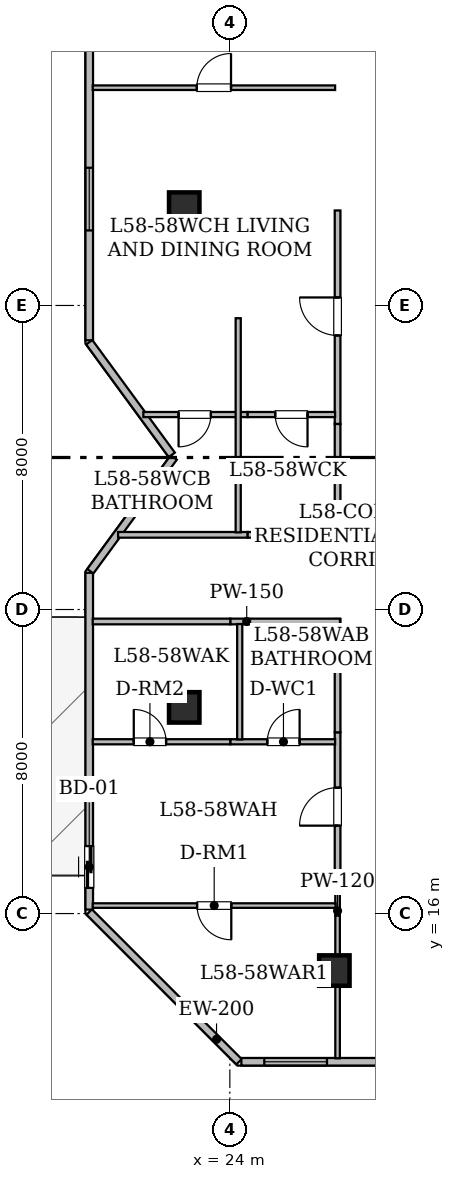
"""IFC4 building model, lengths in metres.
Left out: names, types, materials, properties, quantities, classifications, styles, units other than length and angle.
Written with IfcOpenShell. Run it as: python <this file> out.ifc"""

import sys

from ifc_helpers import new_model, si_unit, direction, frame, frame_2d, origin, origin_2d, place, context, subcontext, project, spatial, rectangle, hollow_rectangle, extrude, element, fill, save


model = new_model("IFC4")
c1 = context("Model", 3, precision=1e-05, world=origin(), true_north=direction((0.0, 1.0)))
c2 = subcontext(c1, "Body", "Model", "MODEL_VIEW")
j1 = project(units=[si_unit("LENGTHUNIT", "METRE"), si_unit("PLANEANGLEUNIT", "RADIAN")], contexts=[c1])
p1 = place(None, origin())
s1 = spatial("IfcSite", under=j1, at=p1, CompositionType="ELEMENT")
p2 = place(p1, origin())
s2 = spatial("IfcBuilding", under=s1, at=p2, CompositionType="ELEMENT")
p3 = place(p2, frame((0.0, 0.0, 228.15)))
s3 = spatial("IfcBuildingStorey", under=s2, at=p3, CompositionType="ELEMENT", Elevation=228.15)
for number, where, z_axis, x_axis in (
    (1, (26.75, 14.5, 0.0), (0.0, 0.0, 1.0), (1.0, 0.0, 0.0)),
    (2, (22.8, 21.425, 0.0), (0.0, 0.0, 1.0), (1.0, 0.0, 0.0)),
    (3, (22.8, 34.575, 0.0), (0.0, 0.0, 1.0), (1.0, 0.0, 0.0)),
):
    element("IfcColumn", number, at=place(p3, frame(where, z_axis=z_axis, x_axis=x_axis)), inside=s3, PredefinedType="COLUMN", context=c2, shape_type="SweptSolid", body=[
        extrude(hollow_rectangle(XDim=0.8, YDim=0.8, WallThickness=0.04, at=origin_2d()), origin(), (0.0, 0.0, 1.0), 3.65),
    ])
p4 = place(p3, frame((24.241, 12.1, 0.0), z_axis=(0.0, 0.0, 1.0), x_axis=(-0.707106781187, 0.707106781187, 0.0)))
e4 = element("IfcWall", 4, at=p4, inside=s3, PredefinedType="STANDARD", context=c2, shape_type="SweptSolid", body=[
    extrude(rectangle(XDim=5.573, YDim=0.2, at=frame_2d((2.787, 0.0))), origin(), (0.0, 0.0, 1.0), 3.43),
])
p5 = place(p3, frame((20.3, 16.104, 0.0), z_axis=(0.0, 0.0, 1.0), x_axis=(0.0, 1.0, 0.0)))
e5 = element("IfcWall", 5, at=p5, inside=s3, PredefinedType="STANDARD", context=c2, shape_type="SweptSolid", body=[
    extrude(rectangle(XDim=8.863, YDim=0.2, at=frame_2d((4.432, 0.0))), origin(), (0.0, 0.0, 1.0), 3.43),
])
p6 = place(p5, frame((0.571, 0.0, 0.0)))
e6 = element("IfcOpeningElement", 6, at=p6, cuts=e5, PredefinedType="OPENING", context=c2, shape_type="SweptSolid", body=[
    extrude(rectangle(XDim=1.1, YDim=2.2, at=frame_2d((0.55, 1.1))), frame((0.0, 0.11, 0.0), z_axis=(0.0, -1.0, 0.0), x_axis=(1.0, 0.0, 0.0)), (0.0, 0.0, 1.0), 0.22),
])
p7 = place(p3, frame((20.329, 25.007, 0.0), z_axis=(0.0, 0.0, 1.0), x_axis=(0.591366515379, 0.806402904564, 0.0)))
e7 = element("IfcWall", 7, at=p7, inside=s3, PredefinedType="STANDARD", context=c2, shape_type="SweptSolid", body=[
    extrude(rectangle(XDim=3.711, YDim=0.2, at=frame_2d((1.856, 0.0))), origin(), (0.0, 0.0, 1.0), 3.43),
])
p8 = place(p3, frame((22.473, 28.069, 0.0), z_axis=(0.0, 0.0, 1.0), x_axis=(-0.591248456881, 0.80648946815, 0.0)))
e8 = element("IfcWall", 8, at=p8, inside=s3, PredefinedType="STANDARD", context=c2, shape_type="SweptSolid", body=[
    extrude(rectangle(XDim=3.675, YDim=0.2, at=frame_2d((1.837, 0.0))), origin(), (0.0, 0.0, 1.0), 3.43),
])
p9 = place(p3, frame((20.3, 31.084, 0.0), z_axis=(0.0, 0.0, 1.0), x_axis=(0.0, 1.0, 0.0)))
e9 = element("IfcWall", 9, at=p9, inside=s3, PredefinedType="STANDARD", context=c2, shape_type="SweptSolid", body=[
    extrude(rectangle(XDim=8.875, YDim=0.2, at=frame_2d((4.438, 0.0))), origin(), (0.0, 0.0, 1.0), 3.43),
])
p10 = place(p9, frame((2.89, 0.0, 0.85)))
e10 = element("IfcOpeningElement", 10, at=p10, cuts=e9, PredefinedType="OPENING", context=c2, shape_type="SweptSolid", body=[
    extrude(rectangle(XDim=1.65, YDim=1.55, at=frame_2d((0.825, 0.775))), frame((0.0, 0.11, 0.0), z_axis=(0.0, -1.0, 0.0), x_axis=(1.0, 0.0, 0.0)), (0.0, 0.0, 1.0), 0.22),
])
p11 = place(p3, frame((65.696, 12.1, 0.0), z_axis=(0.0, 0.0, 1.0), x_axis=(-1.0, 0.0, 0.0)))
e11 = element("IfcWall", 11, at=p11, inside=s3, PredefinedType="STANDARD", context=c2, shape_type="SweptSolid", body=[
    extrude(rectangle(XDim=41.393, YDim=0.2, at=frame_2d((20.697, 0.0))), origin(), (0.0, 0.0, 1.0), 3.43),
])
p12 = place(p11, frame((34.521, 0.0, 0.85)))
e12 = element("IfcOpeningElement", 12, at=p12, cuts=e11, PredefinedType="OPENING", context=c2, shape_type="SweptSolid", body=[
    extrude(rectangle(XDim=1.65, YDim=1.55, at=frame_2d((0.825, 0.775))), frame((0.0, 0.11, 0.0), z_axis=(0.0, -1.0, 0.0), x_axis=(1.0, 0.0, 0.0)), (0.0, 0.0, 1.0), 0.22),
])
p13 = place(p11, frame((39.14, 0.0, 0.85)))
e13 = element("IfcOpeningElement", 13, at=p13, cuts=e11, PredefinedType="OPENING", context=c2, shape_type="SweptSolid", body=[
    extrude(rectangle(XDim=1.65, YDim=1.55, at=frame_2d((0.825, 0.775))), frame((0.0, 0.11, 0.0), z_axis=(0.0, -1.0, 0.0), x_axis=(1.0, 0.0, 0.0)), (0.0, 0.0, 1.0), 0.22),
])
p14 = place(p11, frame((15.596, 0.0, 0.8)))
e14 = element("IfcOpeningElement", 14, at=p14, cuts=e11, PredefinedType="OPENING", context=c2, shape_type="SweptSolid", body=[
    extrude(rectangle(XDim=1.2, YDim=1.5, at=frame_2d((0.6, 0.75))), frame((0.0, 0.11, 0.0), z_axis=(0.0, -1.0, 0.0), x_axis=(1.0, 0.0, 0.0)), (0.0, 0.0, 1.0), 0.22),
])
p15 = place(p11, frame((19.706, 0.0, 0.85)))
e15 = element("IfcOpeningElement", 15, at=p15, cuts=e11, PredefinedType="OPENING", context=c2, shape_type="SweptSolid", body=[
    extrude(rectangle(XDim=1.65, YDim=1.55, at=frame_2d((0.825, 0.775))), frame((0.0, 0.11, 0.0), z_axis=(0.0, -1.0, 0.0), x_axis=(1.0, 0.0, 0.0)), (0.0, 0.0, 1.0), 0.22),
])
p16 = place(p11, frame((11.036, 0.0, 0.85)))
e16 = element("IfcOpeningElement", 16, at=p16, cuts=e11, PredefinedType="OPENING", context=c2, shape_type="SweptSolid", body=[
    extrude(rectangle(XDim=1.65, YDim=1.55, at=frame_2d((0.825, 0.775))), frame((0.0, 0.11, 0.0), z_axis=(0.0, -1.0, 0.0), x_axis=(1.0, 0.0, 0.0)), (0.0, 0.0, 1.0), 0.22),
])
p17 = place(p11, frame((4.786, 0.0, 0.85)))
e17 = element("IfcOpeningElement", 17, at=p17, cuts=e11, PredefinedType="OPENING", context=c2, shape_type="SweptSolid", body=[
    extrude(rectangle(XDim=1.65, YDim=1.55, at=frame_2d((0.825, 0.775))), frame((0.0, 0.11, 0.0), z_axis=(0.0, -1.0, 0.0), x_axis=(1.0, 0.0, 0.0)), (0.0, 0.0, 1.0), 0.22),
])
p18 = place(p3, frame((34.114, 16.835, 0.0), z_axis=(0.0, 0.0, 1.0), x_axis=(-1.0, 0.0, 0.0)))
e18 = element("IfcWall", 18, at=p18, inside=s3, PredefinedType="STANDARD", context=c2, shape_type="SweptSolid", body=[
    extrude(rectangle(XDim=7.214, YDim=0.15, at=frame_2d((3.607, 0.0))), origin(), (0.0, 0.0, 1.0), 2.725),
])
p19 = place(p18, frame((3.053, 0.0, 0.0)))
e19 = element("IfcOpeningElement", 19, at=p19, cuts=e18, PredefinedType="OPENING", context=c2, shape_type="SweptSolid", body=[
    extrude(rectangle(XDim=1.15, YDim=2.2, at=frame_2d((0.575, 1.1))), frame((0.0, 0.085, 0.0), z_axis=(0.0, -1.0, 0.0), x_axis=(1.0, 0.0, 0.0)), (0.0, 0.0, 1.0), 0.17),
])
p20 = place(p3, frame((26.835, 16.9, 0.0), z_axis=(0.0, 0.0, 1.0), x_axis=(0.0, 1.0, 0.0)))
e20 = element("IfcWall", 20, at=p20, inside=s3, PredefinedType="STANDARD", context=c2, shape_type="SweptSolid", body=[
    extrude(rectangle(XDim=3.869, YDim=0.15, at=frame_2d((1.935, 0.0))), origin(), (0.0, 0.0, 1.0), 2.725),
])
p21 = place(p20, frame((1.413, 0.0, 0.0)))
e21 = element("IfcOpeningElement", 21, at=p21, cuts=e20, PredefinedType="OPENING", context=c2, shape_type="SweptSolid", body=[
    extrude(rectangle(XDim=1.0, YDim=2.15, at=frame_2d((0.5, 1.075))), frame((0.0, 0.085, 0.0), z_axis=(0.0, -1.0, 0.0), x_axis=(1.0, 0.0, 0.0)), (0.0, 0.0, 1.0), 0.17),
])
p22 = place(p3, frame((26.835, 20.769, 0.0), z_axis=(0.0, 0.0, 1.0), x_axis=(0.0, 1.0, 0.0)))
e22 = element("IfcWall", 22, at=p22, inside=s3, PredefinedType="STANDARD", context=c2, shape_type="SweptSolid", body=[
    extrude(rectangle(XDim=2.981, YDim=0.15, at=frame_2d((1.49, 0.0))), origin(), (0.0, 0.0, 1.0), 3.43),
])
p23 = place(p3, frame((26.898, 23.685, 0.0), z_axis=(0.0, 0.0, 1.0), x_axis=(-1.0, 0.0, 0.0)))
e23 = element("IfcWall", 23, at=p23, inside=s3, PredefinedType="STANDARD", context=c2, shape_type="SweptSolid", body=[
    extrude(rectangle(XDim=2.887, YDim=0.15, at=frame_2d((1.443, 0.0))), origin(), (0.0, 0.0, 1.0), 3.43),
])
p24 = place(p3, frame((24.011, 23.685, 0.0), z_axis=(0.0, 0.0, 1.0), x_axis=(-1.0, 0.0, 0.0)))
e24 = element("IfcWall", 24, at=p24, inside=s3, PredefinedType="STANDARD", context=c2, shape_type="SweptSolid", body=[
    extrude(rectangle(XDim=3.619, YDim=0.15, at=frame_2d((1.81, 0.0))), origin(), (0.0, 0.0, 1.0), 2.887),
])
p25 = place(p3, frame((26.835, 28.881, 0.0), z_axis=(0.0, 0.0, 1.0), x_axis=(0.0, 1.0, 0.0)))
e25 = element("IfcWall", 25, at=p25, inside=s3, PredefinedType="STANDARD", context=c2, shape_type="SweptSolid", body=[
    extrude(rectangle(XDim=5.619, YDim=0.15, at=frame_2d((2.81, 0.0))), origin(), (0.0, 0.0, 1.0), 3.065),
])
p26 = place(p25, frame((2.33, 0.0, 0.0)))
e26 = element("IfcOpeningElement", 26, at=p26, cuts=e25, PredefinedType="OPENING", context=c2, shape_type="SweptSolid", body=[
    extrude(rectangle(XDim=1.0, YDim=2.15, at=frame_2d((0.5, 1.075))), frame((0.0, 0.085, 0.0), z_axis=(0.0, -1.0, 0.0), x_axis=(1.0, 0.0, 0.0)), (0.0, 0.0, 1.0), 0.17),
])
p27 = place(p3, frame((21.059, 25.965, 0.0), z_axis=(0.0, 0.0, 1.0), x_axis=(1.0, 0.0, 0.0)))
e27 = element("IfcWall", 27, at=p27, inside=s3, PredefinedType="STANDARD", context=c2, shape_type="SweptSolid", body=[
    extrude(rectangle(XDim=3.41, YDim=0.15, at=frame_2d((1.705, 0.0))), origin(), (0.0, 0.0, 1.0), 2.887),
])
p28 = place(p3, frame((24.469, 25.965, 0.0), z_axis=(0.0, 0.0, 1.0), x_axis=(1.0, 0.0, 0.0)))
e28 = element("IfcWall", 28, at=p28, inside=s3, PredefinedType="STANDARD", context=c2, shape_type="SweptSolid", body=[
    extrude(rectangle(XDim=2.431, YDim=0.15, at=frame_2d((1.215, 0.0))), origin(), (0.0, 0.0, 1.0), 3.43),
])
p29 = place(p3, frame((26.835, 25.9, 0.0), z_axis=(0.0, 0.0, 1.0), x_axis=(0.0, 1.0, 0.0)))
e29 = element("IfcWall", 29, at=p29, inside=s3, PredefinedType="STANDARD", context=c2, shape_type="SweptSolid", body=[
    extrude(rectangle(XDim=2.981, YDim=0.15, at=frame_2d((1.491, 0.0))), origin(), (0.0, 0.0, 1.0), 3.43),
])
p30 = place(p3, frame((26.835, 15.947, 0.0), z_axis=(0.0, 0.0, 1.0), x_axis=(0.0, 1.0, 0.0)))
e30 = element("IfcWall", 30, at=p30, inside=s3, PredefinedType="PARTITIONING", context=c2, shape_type="SweptSolid", body=[
    extrude(rectangle(XDim=0.823, YDim=0.12, at=frame_2d((0.412, 0.0))), origin(), (0.0, 0.0, 1.0), 3.43),
])
p31 = place(p3, frame((26.835, 12.192, 0.0), z_axis=(0.0, 0.0, 1.0), x_axis=(0.0, 1.0, 0.0)))
e31 = element("IfcWall", 31, at=p31, inside=s3, PredefinedType="PARTITIONING", context=c2, shape_type="SweptSolid", body=[
    extrude(rectangle(XDim=3.755, YDim=0.12, at=frame_2d((1.877, 0.0))), origin(), (0.0, 0.0, 1.0), 2.725),
])
p32 = place(p3, frame((24.011, 20.52, 0.0), z_axis=(0.0, 0.0, 1.0), x_axis=(1.0, 0.0, 0.0)))
e32 = element("IfcWall", 32, at=p32, inside=s3, PredefinedType="PARTITIONING", context=c2, shape_type="SweptSolid", body=[
    extrude(rectangle(XDim=2.759, YDim=0.135, at=frame_2d((1.379, 0.0))), origin(), (0.0, 0.0, 1.0), 2.725),
])
p33 = place(p32, frame((0.975, 0.0, 0.0)))
e33 = element("IfcOpeningElement", 33, at=p33, cuts=e32, PredefinedType="OPENING", context=c2, shape_type="SweptSolid", body=[
    extrude(rectangle(XDim=0.85, YDim=2.1, at=frame_2d((0.425, 1.05))), frame((0.0, 0.077, 0.0), z_axis=(0.0, -1.0, 0.0), x_axis=(1.0, 0.0, 0.0)), (0.0, 0.0, 1.0), 0.155),
])
p34 = place(p3, frame((20.392, 20.52, 0.0), z_axis=(0.0, 0.0, 1.0), x_axis=(1.0, 0.0, 0.0)))
e34 = element("IfcWall", 34, at=p34, inside=s3, PredefinedType="PARTITIONING", context=c2, shape_type="SweptSolid", body=[
    extrude(rectangle(XDim=3.619, YDim=0.135, at=frame_2d((1.81, 0.0))), origin(), (0.0, 0.0, 1.0), 2.887),
])
p35 = place(p34, frame((1.08, 0.0, 0.0)))
e35 = element("IfcOpeningElement", 35, at=p35, cuts=e34, PredefinedType="OPENING", context=c2, shape_type="SweptSolid", body=[
    extrude(rectangle(XDim=0.85, YDim=2.1, at=frame_2d((0.425, 1.05))), frame((0.0, 0.077, 0.0), z_axis=(0.0, -1.0, 0.0), x_axis=(1.0, 0.0, 0.0)), (0.0, 0.0, 1.0), 0.155),
])
p36 = place(p3, frame((26.783, 16.21, 0.0), z_axis=(0.0, 0.0, 1.0), x_axis=(-1.0, 0.0, 0.0)))
e36 = element("IfcWall", 36, at=p36, inside=s3, PredefinedType="PARTITIONING", context=c2, shape_type="SweptSolid", body=[
    extrude(rectangle(XDim=6.391, YDim=0.12, at=frame_2d((3.195, 0.0))), origin(), (0.0, 0.0, 1.0), 2.887),
])
p37 = place(p36, frame((2.745, 0.0, 0.0)))
e37 = element("IfcOpeningElement", 37, at=p37, cuts=e36, PredefinedType="OPENING", context=c2, shape_type="SweptSolid", body=[
    extrude(rectangle(XDim=0.9, YDim=2.1, at=frame_2d((0.45, 1.05))), frame((0.0, 0.07, 0.0), z_axis=(0.0, -1.0, 0.0), x_axis=(1.0, 0.0, 0.0)), (0.0, 0.0, 1.0), 0.14),
])
p38 = place(p3, frame((24.26, 20.581, 0.0), z_axis=(0.0, 0.0, 1.0), x_axis=(0.0, 1.0, 0.0)))
e38 = element("IfcWall", 38, at=p38, inside=s3, PredefinedType="PARTITIONING", context=c2, shape_type="SweptSolid", body=[
    extrude(rectangle(XDim=3.037, YDim=0.135, at=frame_2d((1.519, 0.0))), origin(), (0.0, 0.0, 1.0), 2.725),
])
p39 = place(p3, frame((24.469, 29.13, 0.0), z_axis=(0.0, 0.0, 1.0), x_axis=(-1.0, 0.0, 0.0)))
e39 = element("IfcWall", 39, at=p39, inside=s3, PredefinedType="PARTITIONING", context=c2, shape_type="SweptSolid", body=[
    extrude(rectangle(XDim=2.745, YDim=0.135, at=frame_2d((1.373, 0.0))), origin(), (0.0, 0.0, 1.0), 2.887),
])
p40 = place(p39, frame((0.968, 0.0, 0.0)))
e40 = element("IfcOpeningElement", 40, at=p40, cuts=e39, PredefinedType="OPENING", context=c2, shape_type="SweptSolid", body=[
    extrude(rectangle(XDim=0.85, YDim=2.1, at=frame_2d((0.425, 1.05))), frame((0.0, 0.077, 0.0), z_axis=(0.0, -1.0, 0.0), x_axis=(1.0, 0.0, 0.0)), (0.0, 0.0, 1.0), 0.155),
])
p41 = place(p3, frame((26.77, 29.13, 0.0), z_axis=(0.0, 0.0, 1.0), x_axis=(-1.0, 0.0, 0.0)))
e41 = element("IfcWall", 41, at=p41, inside=s3, PredefinedType="PARTITIONING", context=c2, shape_type="SweptSolid", body=[
    extrude(rectangle(XDim=2.301, YDim=0.135, at=frame_2d((1.15, 0.0))), origin(), (0.0, 0.0, 1.0), 3.43),
])
p42 = place(p41, frame((0.726, 0.0, 0.0)))
e42 = element("IfcOpeningElement", 42, at=p42, cuts=e41, PredefinedType="OPENING", context=c2, shape_type="SweptSolid", body=[
    extrude(rectangle(XDim=0.85, YDim=2.1, at=frame_2d((0.425, 1.05))), frame((0.0, 0.077, 0.0), z_axis=(0.0, -1.0, 0.0), x_axis=(1.0, 0.0, 0.0)), (0.0, 0.0, 1.0), 0.155),
])
p43 = place(p3, frame((20.392, 37.73, 0.0), z_axis=(0.0, 0.0, 1.0), x_axis=(1.0, 0.0, 0.0)))
e43 = element("IfcWall", 43, at=p43, inside=s3, PredefinedType="PARTITIONING", context=c2, shape_type="SweptSolid", body=[
    extrude(rectangle(XDim=6.378, YDim=0.12, at=frame_2d((3.189, 0.0))), origin(), (0.0, 0.0, 1.0), 2.887),
])
p44 = place(p43, frame((2.739, 0.0, 0.0)))
e44 = element("IfcOpeningElement", 44, at=p44, cuts=e43, PredefinedType="OPENING", context=c2, shape_type="SweptSolid", body=[
    extrude(rectangle(XDim=0.9, YDim=2.1, at=frame_2d((0.45, 1.05))), frame((0.0, 0.07, 0.0), z_axis=(0.0, -1.0, 0.0), x_axis=(1.0, 0.0, 0.0)), (0.0, 0.0, 1.0), 0.14),
])
p45 = place(p3, frame((24.22, 31.665, 0.0), z_axis=(0.0, 0.0, 1.0), x_axis=(0.0, -1.0, 0.0)))
e45 = element("IfcWall", 45, at=p45, inside=s3, PredefinedType="PARTITIONING", context=c2, shape_type="SweptSolid", body=[
    extrude(rectangle(XDim=5.635, YDim=0.135, at=frame_2d((2.817, 0.0))), origin(), (0.0, 0.0, 1.0), 3.43),
])
p46 = place(p6, origin())
e46 = element("IfcDoor", 46, at=p46, inside=s3, OperationType="SLIDING_TO_LEFT", PredefinedType="DOOR", context=c2, shape_type="SweptSolid", body=[
    extrude(rectangle(XDim=1.1, YDim=2.2, at=frame_2d((0.55, 1.1))), frame((0.0, 0.025, 0.0), z_axis=(0.0, -1.0, 0.0), x_axis=(1.0, 0.0, 0.0)), (0.0, 0.0, 1.0), 0.05),
])
fill(e6, e46)
p47 = place(p13, origin())
e47 = element("IfcWindow", 47, at=p47, inside=s3, PartitioningType="SINGLE_PANEL", PredefinedType="WINDOW", context=c2, shape_type="SweptSolid", body=[
    extrude(rectangle(XDim=1.65, YDim=1.55, at=frame_2d((0.825, 0.775))), frame((0.0, 0.03, 0.0), z_axis=(0.0, -1.0, 0.0), x_axis=(1.0, 0.0, 0.0)), (0.0, 0.0, 1.0), 0.06),
])
fill(e13, e47)
p48 = place(p10, origin())
e48 = element("IfcWindow", 48, at=p48, inside=s3, PartitioningType="SINGLE_PANEL", PredefinedType="WINDOW", context=c2, shape_type="SweptSolid", body=[
    extrude(rectangle(XDim=1.65, YDim=1.55, at=frame_2d((0.825, 0.775))), frame((0.0, 0.03, 0.0), z_axis=(0.0, -1.0, 0.0), x_axis=(1.0, 0.0, 0.0)), (0.0, 0.0, 1.0), 0.06),
])
fill(e10, e48)
p49 = place(p21, origin())
e49 = element("IfcDoor", 49, at=p49, inside=s3, OperationType="SINGLE_SWING_LEFT", PredefinedType="DOOR", context=c2, shape_type="SweptSolid", body=[
    extrude(rectangle(XDim=1.0, YDim=2.15, at=frame_2d((0.5, 1.075))), frame((0.0, 0.025, 0.0), z_axis=(0.0, -1.0, 0.0), x_axis=(1.0, 0.0, 0.0)), (0.0, 0.0, 1.0), 0.05),
])
fill(e21, e49)
p50 = place(p26, origin())
e50 = element("IfcDoor", 50, at=p50, inside=s3, OperationType="SINGLE_SWING_RIGHT", PredefinedType="DOOR", context=c2, shape_type="SweptSolid", body=[
    extrude(rectangle(XDim=1.0, YDim=2.15, at=frame_2d((0.5, 1.075))), frame((0.0, 0.025, 0.0), z_axis=(0.0, -1.0, 0.0), x_axis=(1.0, 0.0, 0.0)), (0.0, 0.0, 1.0), 0.05),
])
fill(e26, e50)
p51 = place(p33, origin())
e51 = element("IfcDoor", 51, at=p51, inside=s3, OperationType="SINGLE_SWING_RIGHT", PredefinedType="DOOR", context=c2, shape_type="SweptSolid", body=[
    extrude(rectangle(XDim=0.85, YDim=2.1, at=frame_2d((0.425, 1.05))), frame((0.0, 0.025, 0.0), z_axis=(0.0, -1.0, 0.0), x_axis=(1.0, 0.0, 0.0)), (0.0, 0.0, 1.0), 0.05),
])
fill(e33, e51)
p52 = place(p35, origin())
e52 = element("IfcDoor", 52, at=p52, inside=s3, OperationType="SINGLE_SWING_LEFT", PredefinedType="DOOR", context=c2, shape_type="SweptSolid", body=[
    extrude(rectangle(XDim=0.85, YDim=2.1, at=frame_2d((0.425, 1.05))), frame((0.0, 0.025, 0.0), z_axis=(0.0, -1.0, 0.0), x_axis=(1.0, 0.0, 0.0)), (0.0, 0.0, 1.0), 0.05),
])
fill(e35, e52)
p53 = place(p37, origin())
e53 = element("IfcDoor", 53, at=p53, inside=s3, OperationType="SINGLE_SWING_LEFT", PredefinedType="DOOR", context=c2, shape_type="SweptSolid", body=[
    extrude(rectangle(XDim=0.9, YDim=2.1, at=frame_2d((0.45, 1.05))), frame((0.0, 0.025, 0.0), z_axis=(0.0, -1.0, 0.0), x_axis=(1.0, 0.0, 0.0)), (0.0, 0.0, 1.0), 0.05),
])
fill(e37, e53)
p54 = place(p40, origin())
e54 = element("IfcDoor", 54, at=p54, inside=s3, OperationType="SINGLE_SWING_RIGHT", PredefinedType="DOOR", context=c2, shape_type="SweptSolid", body=[
    extrude(rectangle(XDim=0.85, YDim=2.1, at=frame_2d((0.425, 1.05))), frame((0.0, 0.025, 0.0), z_axis=(0.0, -1.0, 0.0), x_axis=(1.0, 0.0, 0.0)), (0.0, 0.0, 1.0), 0.05),
])
fill(e40, e54)
p55 = place(p42, origin())
e55 = element("IfcDoor", 55, at=p55, inside=s3, OperationType="SINGLE_SWING_LEFT", PredefinedType="DOOR", context=c2, shape_type="SweptSolid", body=[
    extrude(rectangle(XDim=0.85, YDim=2.1, at=frame_2d((0.425, 1.05))), frame((0.0, 0.025, 0.0), z_axis=(0.0, -1.0, 0.0), x_axis=(1.0, 0.0, 0.0)), (0.0, 0.0, 1.0), 0.05),
])
fill(e42, e55)
p56 = place(p44, origin())
e56 = element("IfcDoor", 56, at=p56, inside=s3, OperationType="SINGLE_SWING_RIGHT", PredefinedType="DOOR", context=c2, shape_type="SweptSolid", body=[
    extrude(rectangle(XDim=0.9, YDim=2.1, at=frame_2d((0.45, 1.05))), frame((0.0, 0.025, 0.0), z_axis=(0.0, -1.0, 0.0), x_axis=(1.0, 0.0, 0.0)), (0.0, 0.0, 1.0), 0.05),
])
fill(e44, e56)
save(model, sys.argv[1])
